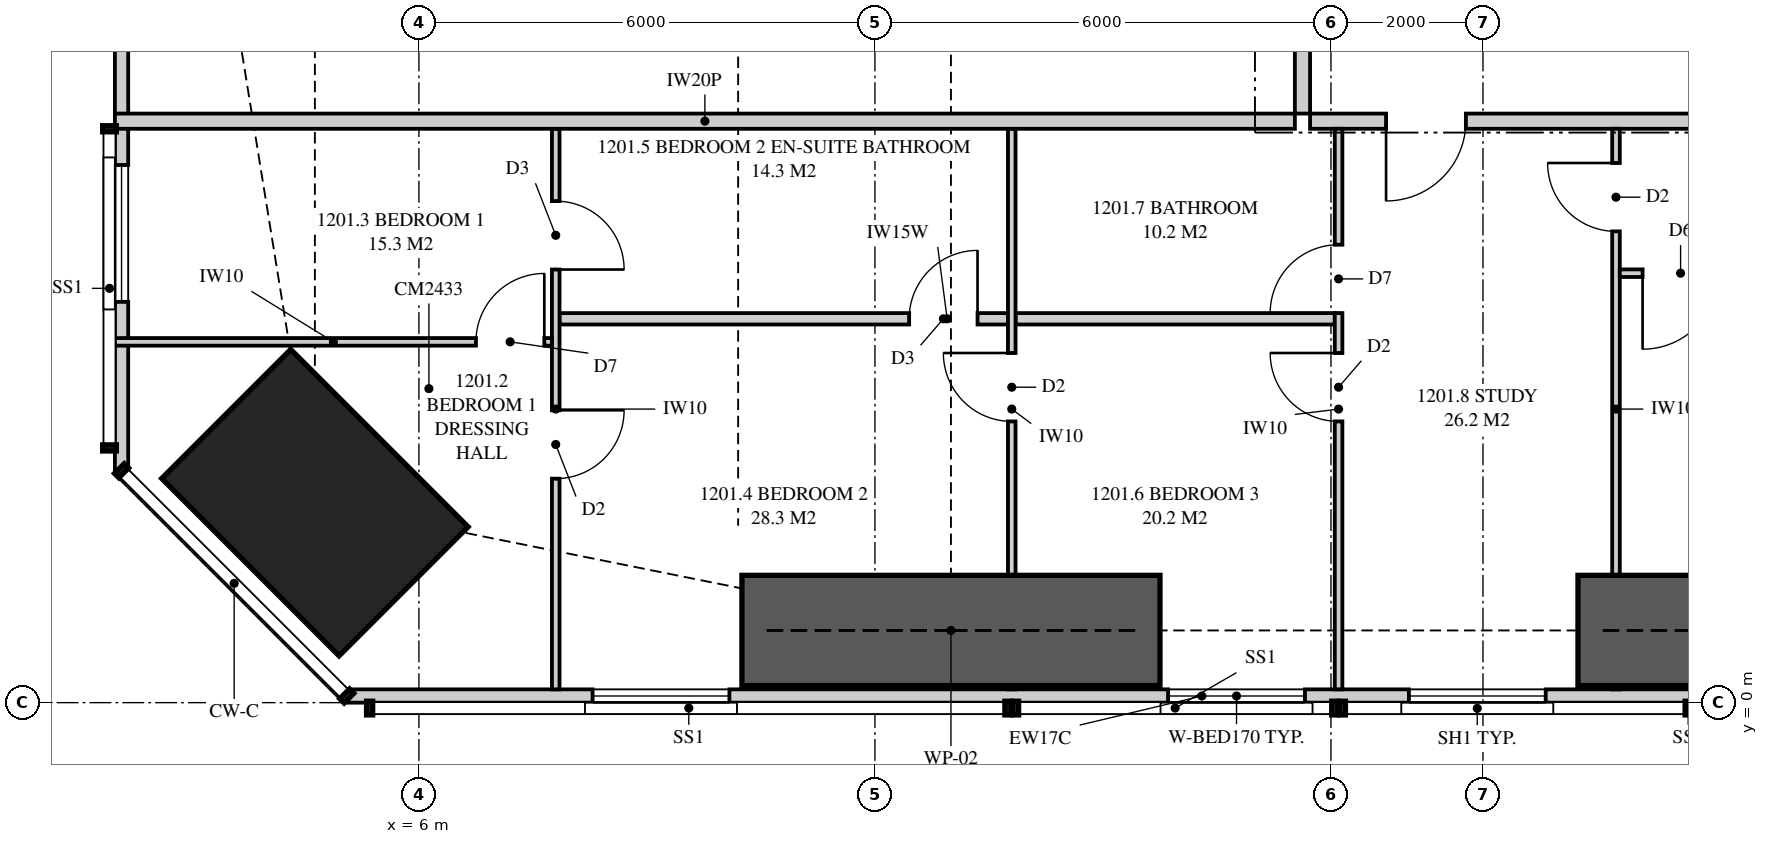
"""IFC4 building model, lengths in metres.
Left out: names, types, materials, properties, quantities, classifications, styles, units other than length and angle.
Written with IfcOpenShell. Run it as: python <this file> out.ifc"""

import sys

from ifc_helpers import new_model, si_unit, direction, frame, frame_2d, origin, origin_2d, place, context, subcontext, project, spatial, polyline, rectangle, outline, extrude, element, fill, save


model = new_model("IFC4")
c1 = context("Model", 3, precision=1e-05, world=origin(), true_north=direction((0.0, 1.0)))
c2 = subcontext(c1, "Body", "Model", "MODEL_VIEW")
j1 = project(units=[si_unit("LENGTHUNIT", "METRE"), si_unit("PLANEANGLEUNIT", "RADIAN")], contexts=[c1])
p1 = place(None, origin())
s1 = spatial("IfcSite", under=j1, at=p1, CompositionType="ELEMENT")
p2 = place(p1, origin())
s2 = spatial("IfcBuilding", under=s1, at=p2, CompositionType="ELEMENT")
p3 = place(p2, frame((0.0, 0.0, 47.8)))
s3 = spatial("IfcBuildingStorey", under=s2, at=p3, CompositionType="ELEMENT", Elevation=47.8)
p4 = place(p3, frame((4.631, 2.631, 0.0), z_axis=(0.0, 0.0, 1.0), x_axis=(0.707106781187, 0.707106781187, 0.0)))
e1 = element("IfcColumn", 1, at=p4, inside=s3, PredefinedType="COLUMN", context=c2, shape_type="SweptSolid", body=[
    extrude(rectangle(XDim=2.4, YDim=3.3, at=origin_2d()), origin(), (0.0, 0.0, 1.0), 3.35),
])
p5 = place(p3, frame((5.051, 0.087, 0.0), z_axis=(0.0, 0.0, 1.0), x_axis=(1.0, 0.0, 0.0)))
e2 = element("IfcWall", 2, at=p5, inside=s3, PredefinedType="SOLIDWALL", context=c2, shape_type="SweptSolid", body=[
    extrude(outline(polyline([(0.0, 0.0), (22.499, 0.0), (22.499, 2.15), (7.949, 2.15), (7.949, 3.11), (7.793, 3.11), (7.793, 2.15), (7.745, 2.15), (7.745, 3.11), (0.0, 3.11), (0.0, 0.0)])), frame((0.0, 0.087, 0.0), z_axis=(0.0, -1.0, 0.0), x_axis=(1.0, 0.0, 0.0)), (0.0, 0.0, 1.0), 0.175),
])
p6 = place(p5, frame((3.234, 0.0, 0.4)))
e3 = element("IfcOpeningElement", 3, at=p6, cuts=e2, PredefinedType="OPENING", context=c2, shape_type="SweptSolid", body=[
    extrude(rectangle(XDim=1.8, YDim=1.7, at=frame_2d((0.9, 0.85))), frame((0.0, 0.097, 0.0), z_axis=(0.0, -1.0, 0.0), x_axis=(1.0, 0.0, 0.0)), (0.0, 0.0, 1.0), 0.195),
])
p7 = place(p5, frame((10.806, 0.0, 0.4)))
e4 = element("IfcOpeningElement", 4, at=p7, cuts=e2, PredefinedType="OPENING", context=c2, shape_type="SweptSolid", body=[
    extrude(rectangle(XDim=1.8, YDim=1.7, at=frame_2d((0.9, 0.85))), frame((0.0, 0.097, 0.0), z_axis=(0.0, -1.0, 0.0), x_axis=(1.0, 0.0, 0.0)), (0.0, 0.0, 1.0), 0.195),
])
p8 = place(p5, frame((13.974, 0.0, 0.4)))
e5 = element("IfcOpeningElement", 5, at=p8, cuts=e2, PredefinedType="OPENING", context=c2, shape_type="SweptSolid", body=[
    extrude(rectangle(XDim=1.8, YDim=1.7, at=frame_2d((0.9, 0.85))), frame((0.0, 0.097, 0.0), z_axis=(0.0, -1.0, 0.0), x_axis=(1.0, 0.0, 0.0)), (0.0, 0.0, 1.0), 0.195),
])
p9 = place(p3, frame((2.087, 18.8, 0.0), z_axis=(0.0, 0.0, 1.0), x_axis=(0.0, -1.0, 0.0)))
e6 = element("IfcWall", 6, at=p9, inside=s3, PredefinedType="SOLIDWALL", context=c2, shape_type="SweptSolid", body=[
    extrude(outline(polyline([(0.0, 0.0), (15.749, 0.0), (15.749, 3.11), (6.019, 3.11), (6.019, 2.15), (5.926, 2.15), (5.926, 3.11), (5.8, 3.11), (5.8, 2.15), (0.0, 2.15), (0.0, 0.0)])), frame((0.0, 0.087, 0.0), z_axis=(0.0, -1.0, 0.0), x_axis=(1.0, 0.0, 0.0)), (0.0, 0.0, 1.0), 0.175),
])
p10 = place(p9, frame((0.95, 0.0, 0.4)))
e7 = element("IfcOpeningElement", 7, at=p10, cuts=e6, PredefinedType="OPENING", context=c2, shape_type="SweptSolid", body=[
    extrude(rectangle(XDim=1.8, YDim=1.7, at=frame_2d((0.9, 0.85))), frame((0.0, 0.097, 0.0), z_axis=(0.0, -1.0, 0.0), x_axis=(1.0, 0.0, 0.0)), (0.0, 0.0, 1.0), 0.195),
])
p11 = place(p9, frame((8.69, 0.0, 0.4)))
e8 = element("IfcOpeningElement", 8, at=p11, cuts=e6, PredefinedType="OPENING", context=c2, shape_type="SweptSolid", body=[
    extrude(rectangle(XDim=1.2, YDim=1.7, at=frame_2d((0.6, 0.85))), frame((0.0, 0.097, 0.0), z_axis=(0.0, -1.0, 0.0), x_axis=(1.0, 0.0, 0.0)), (0.0, 0.0, 1.0), 0.195),
])
p12 = place(p9, frame((11.727, 0.0, 0.4)))
e9 = element("IfcOpeningElement", 9, at=p12, cuts=e6, PredefinedType="OPENING", context=c2, shape_type="SweptSolid", body=[
    extrude(rectangle(XDim=1.8, YDim=1.7, at=frame_2d((0.9, 0.85))), frame((0.0, 0.097, 0.0), z_axis=(0.0, -1.0, 0.0), x_axis=(1.0, 0.0, 0.0)), (0.0, 0.0, 1.0), 0.195),
])
p13 = place(p3, frame((17.725, 7.65, 0.0), z_axis=(0.0, 0.0, 1.0), x_axis=(1.0, 0.0, 0.0)))
e10 = element("IfcWall", 10, at=p13, inside=s3, PredefinedType="PARTITIONING", context=c2, shape_type="SweptSolid", body=[
    extrude(outline(polyline([(0.0, 0.0), (18.625, 0.0), (18.625, 3.11), (17.612, 3.11), (17.612, 2.541), (16.938, 2.541), (16.938, 3.11), (6.612, 3.11), (6.612, 2.541), (5.938, 2.541), (5.938, 3.11), (0.0, 3.11), (0.0, 0.0)])), frame((0.0, 0.1, 0.0), z_axis=(0.0, -1.0, 0.0), x_axis=(1.0, 0.0, 0.0)), (0.0, 0.0, 1.0), 0.2),
])
p14 = place(p13, frame((1.0, 0.0, 0.0)))
e11 = element("IfcOpeningElement", 11, at=p14, cuts=e10, PredefinedType="OPENING", context=c2, shape_type="SweptSolid", body=[
    extrude(rectangle(XDim=1.05, YDim=2.2, at=frame_2d((0.525, 1.1))), frame((0.0, 0.11, 0.0), z_axis=(0.0, -1.0, 0.0), x_axis=(1.0, 0.0, 0.0)), (0.0, 0.0, 1.0), 0.22),
])
p15 = place(p3, frame((7.8, 0.175, 0.0), z_axis=(0.0, 0.0, 1.0), x_axis=(0.0, 1.0, 0.0)))
e12 = element("IfcWall", 12, at=p15, inside=s3, PredefinedType="PARTITIONING", context=c2, shape_type="SweptSolid", body=[
    extrude(outline(polyline([(0.0, 0.0), (7.375, 0.0), (7.375, 3.11), (2.697, 3.11), (2.697, 2.15), (0.943, 2.15), (0.943, 3.11), (0.0, 3.11), (0.0, 0.0)])), frame((0.0, 0.05, 0.0), z_axis=(0.0, -1.0, 0.0), x_axis=(1.0, 0.0, 0.0)), (0.0, 0.0, 1.0), 0.1),
])
p16 = place(p15, frame((2.772, 0.0, 0.0)))
e13 = element("IfcOpeningElement", 13, at=p16, cuts=e12, PredefinedType="OPENING", context=c2, shape_type="SweptSolid", body=[
    extrude(rectangle(XDim=0.9, YDim=2.1, at=frame_2d((0.45, 1.05))), frame((0.0, 0.06, 0.0), z_axis=(0.0, -1.0, 0.0), x_axis=(1.0, 0.0, 0.0)), (0.0, 0.0, 1.0), 0.12),
])
p17 = place(p15, frame((5.523, 0.0, 0.0)))
e14 = element("IfcOpeningElement", 14, at=p17, cuts=e12, PredefinedType="OPENING", context=c2, shape_type="SweptSolid", body=[
    extrude(rectangle(XDim=0.9, YDim=2.1, at=frame_2d((0.45, 1.05))), frame((0.0, 0.06, 0.0), z_axis=(0.0, -1.0, 0.0), x_axis=(1.0, 0.0, 0.0)), (0.0, 0.0, 1.0), 0.12),
])
p18 = place(p3, frame((13.8, 0.175, 0.0), z_axis=(0.0, 0.0, 1.0), x_axis=(0.0, 1.0, 0.0)))
e15 = element("IfcWall", 15, at=p18, inside=s3, PredefinedType="PARTITIONING", context=c2, shape_type="SweptSolid", body=[
    extrude(outline(polyline([(1.635, 2.15), (0.0, 2.15), (0.0, 0.0), (7.375, 0.0), (7.375, 3.11), (1.635, 3.11), (1.635, 2.15)]), holes=[polyline([(1.021, 0.126), (0.529, 0.126), (0.529, 0.919), (1.021, 0.919), (1.021, 0.126)]), polyline([(1.021, 1.231), (0.529, 1.231), (0.529, 2.024), (1.021, 2.024), (1.021, 1.231)])]), frame((0.0, 0.05, 0.0), z_axis=(0.0, -1.0, 0.0), x_axis=(1.0, 0.0, 0.0)), (0.0, 0.0, 1.0), 0.1),
])
p19 = place(p18, frame((3.525, 0.0, 0.0)))
e16 = element("IfcOpeningElement", 16, at=p19, cuts=e15, PredefinedType="OPENING", context=c2, shape_type="SweptSolid", body=[
    extrude(rectangle(XDim=0.9, YDim=2.1, at=frame_2d((0.45, 1.05))), frame((0.0, 0.06, 0.0), z_axis=(0.0, -1.0, 0.0), x_axis=(1.0, 0.0, 0.0)), (0.0, 0.0, 1.0), 0.12),
])
p20 = place(p3, frame((18.1, 0.175, 0.0), z_axis=(0.0, 0.0, 1.0), x_axis=(0.0, 1.0, 0.0)))
e17 = element("IfcWall", 17, at=p20, inside=s3, PredefinedType="PARTITIONING", context=c2, shape_type="SweptSolid", body=[
    extrude(outline(polyline([(0.0, 0.0), (7.375, 0.0), (7.375, 3.11), (1.635, 3.11), (1.635, 2.15), (0.0, 2.15), (0.0, 3.11), (0.0, 0.0)])), frame((0.0, 0.05, 0.0), z_axis=(0.0, -1.0, 0.0), x_axis=(1.0, 0.0, 0.0)), (0.0, 0.0, 1.0), 0.1),
])
p21 = place(p20, frame((3.525, 0.0, 0.0)))
e18 = element("IfcOpeningElement", 18, at=p21, cuts=e17, PredefinedType="OPENING", context=c2, shape_type="SweptSolid", body=[
    extrude(rectangle(XDim=0.9, YDim=2.1, at=frame_2d((0.45, 1.05))), frame((0.0, 0.06, 0.0), z_axis=(0.0, -1.0, 0.0), x_axis=(1.0, 0.0, 0.0)), (0.0, 0.0, 1.0), 0.12),
])
p22 = place(p20, frame((4.95, 0.0, 0.0)))
e19 = element("IfcOpeningElement", 19, at=p22, cuts=e17, PredefinedType="OPENING", context=c2, shape_type="SweptSolid", body=[
    extrude(rectangle(XDim=0.9, YDim=2.1, at=frame_2d((0.45, 1.05))), frame((0.0, 0.06, 0.0), z_axis=(0.0, -1.0, 0.0), x_axis=(1.0, 0.0, 0.0)), (0.0, 0.0, 1.0), 0.12),
])
p23 = place(p3, frame((2.0, 4.747, 0.0), z_axis=(0.0, 0.0, 1.0), x_axis=(1.0, 0.0, 0.0)))
e20 = element("IfcWall", 20, at=p23, inside=s3, PredefinedType="PARTITIONING", context=c2, shape_type="SweptSolid", body=[
    extrude(outline(polyline([(0.0, 0.0), (5.75, 0.0), (5.75, 3.11), (3.16, 3.11), (3.16, 2.15), (1.417, 2.15), (1.417, 3.11), (0.0, 3.11), (0.0, 0.0)])), frame((0.0, 0.05, 0.0), z_axis=(0.0, -1.0, 0.0), x_axis=(1.0, 0.0, 0.0)), (0.0, 0.0, 1.0), 0.1),
])
p24 = place(p23, frame((4.75, 0.0, 0.0)))
e21 = element("IfcOpeningElement", 21, at=p24, cuts=e20, PredefinedType="OPENING", context=c2, shape_type="SweptSolid", body=[
    extrude(rectangle(XDim=0.9, YDim=2.1, at=frame_2d((0.45, 1.05))), frame((0.0, 0.06, 0.0), z_axis=(0.0, -1.0, 0.0), x_axis=(1.0, 0.0, 0.0)), (0.0, 0.0, 1.0), 0.12),
])
p25 = place(p3, frame((7.85, 5.05, 0.0), z_axis=(0.0, 0.0, 1.0), x_axis=(1.0, 0.0, 0.0)))
e22 = element("IfcWall", 22, at=p25, inside=s3, PredefinedType="PLUMBINGWALL", context=c2, shape_type="SweptSolid", body=[
    extrude(outline(polyline([(0.0, 0.0), (5.9, 0.0), (5.9, 3.11), (5.462, 3.11), (5.462, 2.541), (4.838, 2.541), (4.838, 3.11), (3.635, 3.11), (3.635, 2.51), (1.065, 2.51), (1.065, 3.11), (0.0, 3.11), (0.0, 0.0)])), frame((0.0, 0.075, 0.0), z_axis=(0.0, -1.0, 0.0), x_axis=(1.0, 0.0, 0.0)), (0.0, 0.0, 1.0), 0.15),
])
p26 = place(p25, frame((4.6, 0.0, 0.0)))
e23 = element("IfcOpeningElement", 23, at=p26, cuts=e22, PredefinedType="OPENING", context=c2, shape_type="SweptSolid", body=[
    extrude(rectangle(XDim=0.9, YDim=2.1, at=frame_2d((0.45, 1.05))), frame((0.0, 0.085, 0.0), z_axis=(0.0, -1.0, 0.0), x_axis=(1.0, 0.0, 0.0)), (0.0, 0.0, 1.0), 0.17),
])
p27 = place(p3, frame((13.85, 5.05, 0.0), z_axis=(0.0, 0.0, 1.0), x_axis=(1.0, 0.0, 0.0)))
e24 = element("IfcWall", 24, at=p27, inside=s3, PredefinedType="PLUMBINGWALL", context=c2, shape_type="SweptSolid", body=[
    extrude(rectangle(XDim=4.2, YDim=0.15, at=frame_2d((2.1, 0.0))), origin(), (0.0, 0.0, 1.0), 3.11),
])
p28 = place(p3, frame((21.75, 0.175, 0.0), z_axis=(0.0, 0.0, 1.0), x_axis=(0.0, 1.0, 0.0)))
e25 = element("IfcWall", 25, at=p28, inside=s3, PredefinedType="PARTITIONING", context=c2, shape_type="SweptSolid", body=[
    extrude(outline(polyline([(0.0, 0.0), (7.375, 0.0), (7.375, 3.11), (1.635, 3.11), (1.635, 2.15), (0.0, 2.15), (0.0, 3.11), (0.0, 0.0)])), frame((0.0, 0.05, 0.0), z_axis=(0.0, -1.0, 0.0), x_axis=(1.0, 0.0, 0.0)), (0.0, 0.0, 1.0), 0.1),
])
p29 = place(p28, frame((6.025, 0.0, 0.0)))
e26 = element("IfcOpeningElement", 26, at=p29, cuts=e25, PredefinedType="OPENING", context=c2, shape_type="SweptSolid", body=[
    extrude(rectangle(XDim=0.9, YDim=2.1, at=frame_2d((0.45, 1.05))), frame((0.0, 0.06, 0.0), z_axis=(0.0, -1.0, 0.0), x_axis=(1.0, 0.0, 0.0)), (0.0, 0.0, 1.0), 0.12),
])
p30 = place(p3, frame((21.8, 5.65, 0.0), z_axis=(0.0, 0.0, 1.0), x_axis=(1.0, 0.0, 0.0)))
e27 = element("IfcWall", 27, at=p30, inside=s3, PredefinedType="PARTITIONING", context=c2, shape_type="SweptSolid", body=[
    extrude(outline(polyline([(0.0, 0.0), (10.9, 0.0), (10.9, 3.11), (2.487, 3.11), (2.487, 2.541), (1.913, 2.541), (1.913, 3.11), (0.0, 3.11), (0.0, 0.0)])), frame((0.0, 0.05, 0.0), z_axis=(0.0, -1.0, 0.0), x_axis=(1.0, 0.0, 0.0)), (0.0, 0.0, 1.0), 0.1),
])
p31 = place(p30, frame((0.3, 0.0, 0.0)))
e28 = element("IfcOpeningElement", 28, at=p31, cuts=e27, PredefinedType="OPENING", context=c2, shape_type="SweptSolid", body=[
    extrude(rectangle(XDim=1.0, YDim=2.1, at=frame_2d((0.5, 1.05))), frame((0.0, 0.06, 0.0), z_axis=(0.0, -1.0, 0.0), x_axis=(1.0, 0.0, 0.0)), (0.0, 0.0, 1.0), 0.12),
])
p32 = place(p3, frame((2.0, 7.65, 0.0), z_axis=(0.0, 0.0, 1.0), x_axis=(1.0, 0.0, 0.0)))
e29 = element("IfcWall", 29, at=p32, inside=s3, PredefinedType="PARTITIONING", context=c2, shape_type="SweptSolid", body=[
    extrude(outline(polyline([(0.0, 0.0), (15.525, 0.0), (15.525, 3.11), (11.337, 3.11), (11.337, 2.541), (10.663, 2.541), (10.663, 3.11), (9.51, 3.11), (9.51, 2.51), (6.89, 2.51), (6.89, 3.11), (2.969, 3.11), (2.969, 2.541), (2.74, 2.541), (2.74, 2.15), (0.896, 2.15), (0.896, 3.11), (0.0, 3.11), (0.0, 0.0)])), frame((0.0, 0.1, 0.0), z_axis=(0.0, -1.0, 0.0), x_axis=(1.0, 0.0, 0.0)), (0.0, 0.0, 1.0), 0.2),
])
p33 = place(p3, frame((17.625, 7.75, 0.0), z_axis=(0.0, 0.0, 1.0), x_axis=(0.0, 1.0, 0.0)))
e30 = element("IfcWall", 30, at=p33, inside=s3, PredefinedType="PARTITIONING", context=c2, shape_type="SweptSolid", body=[
    extrude(rectangle(XDim=1.45, YDim=0.2, at=frame_2d((0.725, 0.0))), origin(), (0.0, 0.0, 1.0), 3.11),
])
for number, where, z_axis, x_axis in (
    (31, (10.25, 0.95, 0.0), (0.0, 0.0, 1.0), (1.0, 0.0, 0.0)),
    (32, (21.25, 0.95, 0.0), (0.0, 0.0, 1.0), (1.0, 0.0, 0.0)),
):
    element("IfcWall", number, at=place(p3, frame(where, z_axis=z_axis, x_axis=x_axis)), inside=s3, PredefinedType="SHEAR", context=c2, shape_type="SweptSolid", body=[
        extrude(rectangle(XDim=5.5, YDim=1.45, at=frame_2d((2.75, 0.0))), origin(), (0.0, 0.0, 1.0), 3.35),
    ])
p34 = place(p6, origin())
e33 = element("IfcWindow", 33, at=p34, inside=s3, PartitioningType="SINGLE_PANEL", PredefinedType="WINDOW", context=c2, shape_type="SweptSolid", body=[
    extrude(rectangle(XDim=1.8, YDim=1.7, at=frame_2d((0.9, 0.85))), frame((0.0, 0.03, 0.0), z_axis=(0.0, -1.0, 0.0), x_axis=(1.0, 0.0, 0.0)), (0.0, 0.0, 1.0), 0.06),
])
fill(e3, e33)
p35 = place(p7, origin())
e34 = element("IfcWindow", 34, at=p35, inside=s3, PartitioningType="SINGLE_PANEL", PredefinedType="WINDOW", context=c2, shape_type="SweptSolid", body=[
    extrude(rectangle(XDim=1.8, YDim=1.7, at=frame_2d((0.9, 0.85))), frame((0.0, 0.03, 0.0), z_axis=(0.0, -1.0, 0.0), x_axis=(1.0, 0.0, 0.0)), (0.0, 0.0, 1.0), 0.06),
])
fill(e4, e34)
p36 = place(p8, origin())
e35 = element("IfcWindow", 35, at=p36, inside=s3, PartitioningType="SINGLE_PANEL", PredefinedType="WINDOW", context=c2, shape_type="SweptSolid", body=[
    extrude(rectangle(XDim=1.8, YDim=1.7, at=frame_2d((0.9, 0.85))), frame((0.0, 0.03, 0.0), z_axis=(0.0, -1.0, 0.0), x_axis=(1.0, 0.0, 0.0)), (0.0, 0.0, 1.0), 0.06),
])
fill(e5, e35)
p37 = place(p12, origin())
e36 = element("IfcWindow", 36, at=p37, inside=s3, PartitioningType="SINGLE_PANEL", PredefinedType="WINDOW", context=c2, shape_type="SweptSolid", body=[
    extrude(rectangle(XDim=1.8, YDim=1.7, at=frame_2d((0.9, 0.85))), frame((0.0, 0.03, 0.0), z_axis=(0.0, -1.0, 0.0), x_axis=(1.0, 0.0, 0.0)), (0.0, 0.0, 1.0), 0.06),
])
fill(e9, e36)
p38 = place(p14, frame((1.05, 0.0, 0.0), z_axis=(0.0, 0.0, 1.0), x_axis=(-1.0, 0.0, 0.0)))
e37 = element("IfcDoor", 37, at=p38, inside=s3, OperationType="SINGLE_SWING_RIGHT", PredefinedType="DOOR", context=c2, shape_type="SweptSolid", body=[
    extrude(rectangle(XDim=1.05, YDim=2.2, at=frame_2d((0.525, 1.1))), frame((0.0, 0.025, 0.0), z_axis=(0.0, -1.0, 0.0), x_axis=(1.0, 0.0, 0.0)), (0.0, 0.0, 1.0), 0.05),
])
fill(e11, e37)
p39 = place(p24, origin())
e38 = element("IfcDoor", 38, at=p39, inside=s3, OperationType="SINGLE_SWING_RIGHT", PredefinedType="DOOR", context=c2, shape_type="SweptSolid", body=[
    extrude(rectangle(XDim=0.9, YDim=2.1, at=frame_2d((0.45, 1.05))), frame((0.0, 0.025, 0.0), z_axis=(0.0, -1.0, 0.0), x_axis=(1.0, 0.0, 0.0)), (0.0, 0.0, 1.0), 0.05),
])
fill(e21, e38)
p40 = place(p16, frame((0.9, 0.0, 0.0), z_axis=(0.0, 0.0, 1.0), x_axis=(-1.0, 0.0, 0.0)))
e39 = element("IfcDoor", 39, at=p40, inside=s3, OperationType="SINGLE_SWING_LEFT", PredefinedType="DOOR", context=c2, shape_type="SweptSolid", body=[
    extrude(rectangle(XDim=0.9, YDim=2.1, at=frame_2d((0.45, 1.05))), frame((0.0, 0.025, 0.0), z_axis=(0.0, -1.0, 0.0), x_axis=(1.0, 0.0, 0.0)), (0.0, 0.0, 1.0), 0.05),
])
fill(e13, e39)
p41 = place(p19, origin())
e40 = element("IfcDoor", 40, at=p41, inside=s3, OperationType="SINGLE_SWING_RIGHT", PredefinedType="DOOR", context=c2, shape_type="SweptSolid", body=[
    extrude(rectangle(XDim=0.9, YDim=2.1, at=frame_2d((0.45, 1.05))), frame((0.0, 0.025, 0.0), z_axis=(0.0, -1.0, 0.0), x_axis=(1.0, 0.0, 0.0)), (0.0, 0.0, 1.0), 0.05),
])
fill(e16, e40)
p42 = place(p26, origin())
e41 = element("IfcDoor", 41, at=p42, inside=s3, OperationType="SINGLE_SWING_RIGHT", PredefinedType="DOOR", context=c2, shape_type="SweptSolid", body=[
    extrude(rectangle(XDim=0.9, YDim=2.1, at=frame_2d((0.45, 1.05))), frame((0.0, 0.025, 0.0), z_axis=(0.0, -1.0, 0.0), x_axis=(1.0, 0.0, 0.0)), (0.0, 0.0, 1.0), 0.05),
])
fill(e23, e41)
p43 = place(p21, origin())
e42 = element("IfcDoor", 42, at=p43, inside=s3, OperationType="SINGLE_SWING_RIGHT", PredefinedType="DOOR", context=c2, shape_type="SweptSolid", body=[
    extrude(rectangle(XDim=0.9, YDim=2.1, at=frame_2d((0.45, 1.05))), frame((0.0, 0.025, 0.0), z_axis=(0.0, -1.0, 0.0), x_axis=(1.0, 0.0, 0.0)), (0.0, 0.0, 1.0), 0.05),
])
fill(e18, e42)
p44 = place(p22, origin())
e43 = element("IfcDoor", 43, at=p44, inside=s3, OperationType="SINGLE_SWING_LEFT", PredefinedType="DOOR", context=c2, shape_type="SweptSolid", body=[
    extrude(rectangle(XDim=0.9, YDim=2.1, at=frame_2d((0.45, 1.05))), frame((0.0, 0.025, 0.0), z_axis=(0.0, -1.0, 0.0), x_axis=(1.0, 0.0, 0.0)), (0.0, 0.0, 1.0), 0.05),
])
fill(e19, e43)
p45 = place(p17, frame((0.9, 0.0, 0.0), z_axis=(0.0, 0.0, 1.0), x_axis=(-1.0, 0.0, 0.0)))
e44 = element("IfcDoor", 44, at=p45, inside=s3, OperationType="SINGLE_SWING_RIGHT", PredefinedType="DOOR", context=c2, shape_type="SweptSolid", body=[
    extrude(rectangle(XDim=0.9, YDim=2.1, at=frame_2d((0.45, 1.05))), frame((0.0, 0.025, 0.0), z_axis=(0.0, -1.0, 0.0), x_axis=(1.0, 0.0, 0.0)), (0.0, 0.0, 1.0), 0.05),
])
fill(e14, e44)
p46 = place(p29, origin())
e45 = element("IfcDoor", 45, at=p46, inside=s3, OperationType="SINGLE_SWING_RIGHT", PredefinedType="DOOR", context=c2, shape_type="SweptSolid", body=[
    extrude(rectangle(XDim=0.9, YDim=2.1, at=frame_2d((0.45, 1.05))), frame((0.0, 0.025, 0.0), z_axis=(0.0, -1.0, 0.0), x_axis=(1.0, 0.0, 0.0)), (0.0, 0.0, 1.0), 0.05),
])
fill(e26, e45)
p47 = place(p31, frame((1.0, 0.0, 0.0), z_axis=(0.0, 0.0, 1.0), x_axis=(-1.0, 0.0, 0.0)))
e46 = element("IfcDoor", 46, at=p47, inside=s3, OperationType="SINGLE_SWING_RIGHT", PredefinedType="DOOR", context=c2, shape_type="SweptSolid", body=[
    extrude(rectangle(XDim=1.0, YDim=2.1, at=frame_2d((0.5, 1.05))), frame((0.0, 0.025, 0.0), z_axis=(0.0, -1.0, 0.0), x_axis=(1.0, 0.0, 0.0)), (0.0, 0.0, 1.0), 0.05),
])
fill(e28, e46)
save(model, sys.argv[1])
